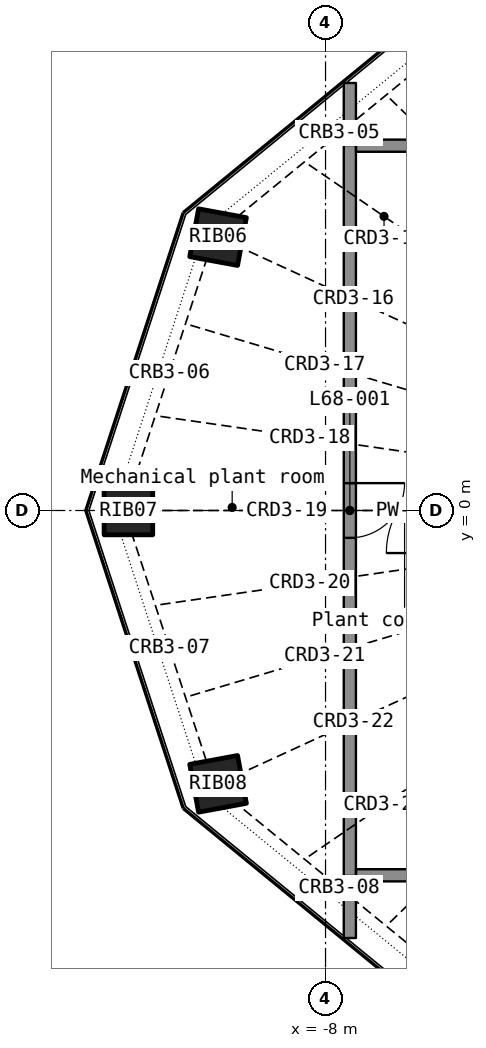
"""IFC4 building model, lengths in metres.
Left out: names, types, materials, properties, quantities, classifications, styles, units other than length and angle.
Written with IfcOpenShell. Run it as: python <this file> out.ifc"""

import sys

from ifc_helpers import new_model, si_unit, direction, frame, frame_2d, origin, origin_2d, place, context, subcontext, project, spatial, rectangle, hollow_rectangle, extrude, element, fill, save


model = new_model("IFC4")
c1 = context("Model", 3, precision=1e-05, world=origin(), true_north=direction((0.0, 1.0)))
c2 = subcontext(c1, "Body", "Model", "MODEL_VIEW")
j1 = project(units=[si_unit("LENGTHUNIT", "METRE"), si_unit("PLANEANGLEUNIT", "RADIAN")], contexts=[c1])
p1 = place(None, origin())
s1 = spatial("IfcSite", under=j1, at=p1, CompositionType="ELEMENT")
p2 = place(p1, origin())
s2 = spatial("IfcBuilding", under=s1, at=p2, CompositionType="ELEMENT")
p3 = place(p2, frame((0.0, 0.0, 280.4)))
s3 = spatial("IfcBuildingStorey", under=s2, at=p3, CompositionType="ELEMENT", Elevation=280.4)
p4 = place(p3, frame((-9.767, 4.496, 0.0), z_axis=(0.119027382, -0.054797277, 0.991377698), x_axis=(0.574755947, 0.817978884, -0.023793837)))
e1 = element("IfcColumn", 1, at=p4, inside=s3, PredefinedType="COLUMN", context=c2, shape_type="SweptSolid", body=[
    extrude(hollow_rectangle(XDim=0.8, YDim=0.8, WallThickness=0.025, at=origin_2d()), origin(), (0.0, 0.0, 1.0), 3.934),
])
p5 = place(p3, frame((-11.242, 0.0, 0.0), z_axis=(0.136914367, 0.0, 0.990582887), x_axis=(0.0, 1.0, 0.0)))
e2 = element("IfcColumn", 2, at=p5, inside=s3, PredefinedType="COLUMN", context=c2, shape_type="SweptSolid", body=[
    extrude(hollow_rectangle(XDim=0.8, YDim=0.8, WallThickness=0.025, at=origin_2d()), origin(), (0.0, 0.0, 1.0), 3.937),
])
p6 = place(p3, frame((-9.767, -4.496, 0.0), z_axis=(0.119027382, 0.054797277, 0.991377698), x_axis=(-0.574755947, 0.817978884, 0.023793837)))
e3 = element("IfcColumn", 3, at=p6, inside=s3, PredefinedType="COLUMN", context=c2, shape_type="SweptSolid", body=[
    extrude(hollow_rectangle(XDim=0.8, YDim=0.8, WallThickness=0.025, at=origin_2d()), origin(), (0.0, 0.0, 1.0), 3.934),
])
p7 = place(p3, frame((-7.6, 6.012, 0.0), z_axis=(0.0, 0.0, 1.0), x_axis=(0.0, -1.0, 0.0)))
e4 = element("IfcWall", 4, at=p7, inside=s3, PredefinedType="PARTITIONING", context=c2, shape_type="SweptSolid", body=[
    extrude(rectangle(XDim=12.024, YDim=0.2, at=frame_2d((6.012, 0.0))), origin(), (0.0, 0.0, 1.0), 2.9),
])
p8 = place(p7, frame((5.562, 0.0, 0.0)))
e5 = element("IfcOpeningElement", 5, at=p8, cuts=e4, PredefinedType="OPENING", context=c2, shape_type="SweptSolid", body=[
    extrude(rectangle(XDim=0.9, YDim=2.1, at=frame_2d((0.45, 1.05))), frame((0.0, 0.11, 0.0), z_axis=(0.0, -1.0, 0.0), x_axis=(1.0, 0.0, 0.0)), (0.0, 0.0, 1.0), 0.22),
])
for number, where, z_axis, x_axis in (
    (6, (-7.498, -6.0, 0.0), (0.0, 0.0, 1.0), (1.0, 0.0, 0.0)),
    (7, (-5.813, 6.0, 0.0), (0.0, 0.0, 1.0), (-1.0, 0.0, 0.0)),
):
    element("IfcWall", number, at=place(p3, frame(where, z_axis=z_axis, x_axis=x_axis)), inside=s3, PredefinedType="PARTITIONING", context=c2, shape_type="SweptSolid", body=[
        extrude(rectangle(XDim=1.685, YDim=0.2, at=frame_2d((0.843, 0.0))), origin(), (0.0, 0.0, 1.0), 2.9),
    ])
p9 = place(p3, frame((-7.6, -7.031, 0.0), z_axis=(0.0, 0.0, 1.0), x_axis=(0.0, 1.0, 0.0)))
e8 = element("IfcWall", 8, at=p9, inside=s3, PredefinedType="PARTITIONING", context=c2, shape_type="SweptSolid", body=[
    extrude(rectangle(XDim=1.019, YDim=0.2, at=frame_2d((0.509, 0.0))), origin(), (0.0, 0.0, 1.0), 2.9),
])
p10 = place(p3, frame((-7.6, 6.013, 0.0), z_axis=(0.0, 0.0, 1.0), x_axis=(0.0, 1.0, 0.0)))
e9 = element("IfcWall", 9, at=p10, inside=s3, PredefinedType="PARTITIONING", context=c2, shape_type="SweptSolid", body=[
    extrude(rectangle(XDim=1.018, YDim=0.2, at=frame_2d((0.509, 0.0))), origin(), (0.0, 0.0, 1.0), 2.9),
])
p11 = place(p8, origin())
e10 = element("IfcDoor", 10, at=p11, inside=s3, OperationType="SINGLE_SWING_LEFT", PredefinedType="DOOR", context=c2, shape_type="SweptSolid", body=[
    extrude(rectangle(XDim=0.9, YDim=2.1, at=frame_2d((0.45, 1.05))), frame((0.0, 0.025, 0.0), z_axis=(0.0, -1.0, 0.0), x_axis=(1.0, 0.0, 0.0)), (0.0, 0.0, 1.0), 0.05),
])
fill(e5, e10)
save(model, sys.argv[1])
